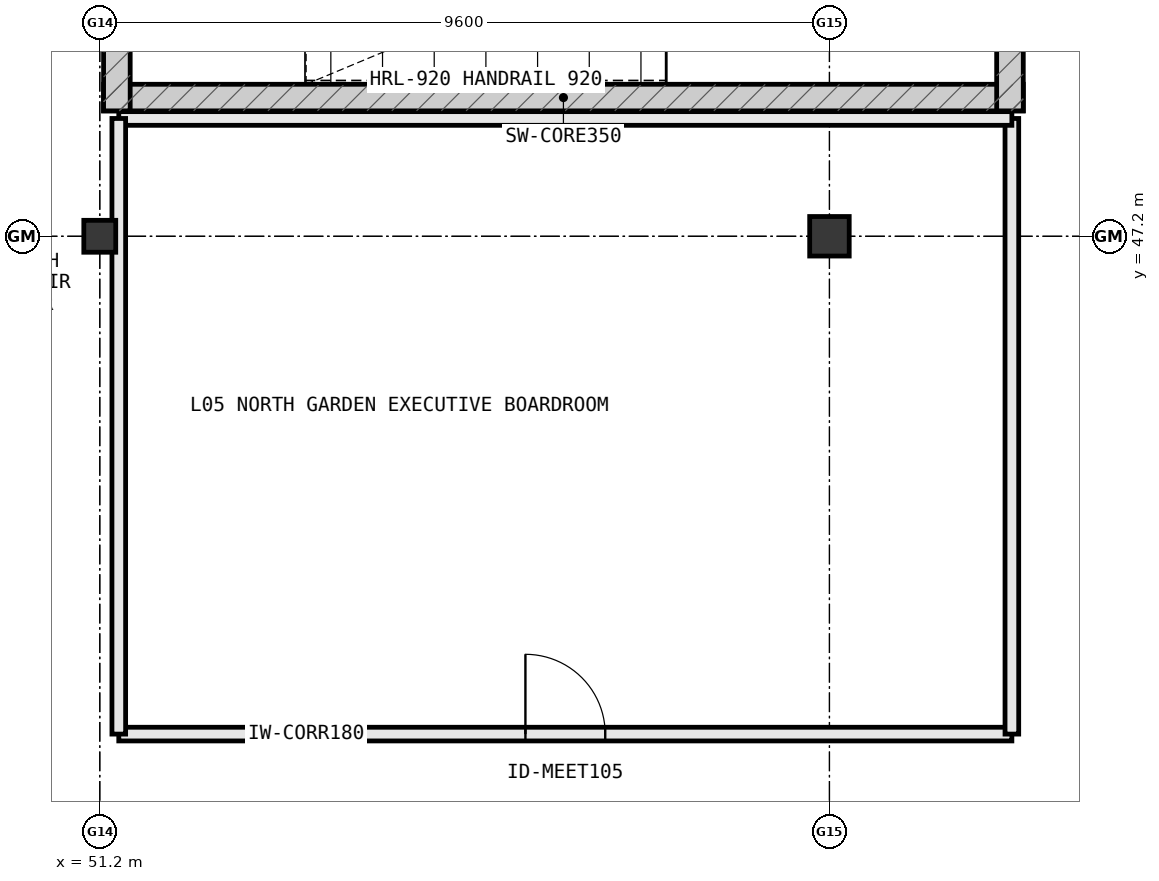
"""IFC4 building model, lengths in metres.
Left out: names, types, materials, properties, quantities, classifications, styles, units other than length and angle.
Written with IfcOpenShell. Run it as: python <this file> out.ifc"""

import sys

from ifc_helpers import new_model, si_unit, direction, frame, frame_2d, origin, origin_2d, place, context, subcontext, project, spatial, rectangle, extrude, element, fill, save


model = new_model("IFC4")
c1 = context("Model", 3, precision=1e-05, world=origin(), true_north=direction((0.0, 1.0)))
c2 = subcontext(c1, "Body", "Model", "MODEL_VIEW")
j1 = project(units=[si_unit("LENGTHUNIT", "METRE"), si_unit("PLANEANGLEUNIT", "RADIAN")], contexts=[c1])
p1 = place(None, origin())
s1 = spatial("IfcSite", under=j1, at=p1, CompositionType="ELEMENT")
p2 = place(p1, origin())
s2 = spatial("IfcBuilding", under=s1, at=p2, CompositionType="ELEMENT")
p3 = place(p2, frame((0.0, 0.0, 23.8)))
s3 = spatial("IfcBuildingStorey", under=s2, at=p3, CompositionType="ELEMENT", Elevation=23.8)
p4 = place(p3, frame((60.8, 47.2, 0.0), z_axis=(0.0, 0.0, 1.0), x_axis=(1.0, 0.0, 0.0)))
e1 = element("IfcColumn", 1, at=p4, inside=s3, PredefinedType="COLUMN", context=c2, shape_type="SweptSolid", body=[
    extrude(rectangle(XDim=0.52, YDim=0.52, at=origin_2d()), origin(), (0.0, 0.0, 1.0), 3.8),
])
p5 = place(p3, frame((51.2, 47.2, 0.0), z_axis=(0.0, 0.0, 1.0), x_axis=(1.0, 0.0, 0.0)))
e2 = element("IfcColumn", 2, at=p5, inside=s3, PredefinedType="COLUMN", context=c2, shape_type="SweptSolid", body=[
    extrude(rectangle(XDim=0.42, YDim=0.42, at=origin_2d()), origin(), (0.0, 0.0, 1.0), 3.8),
])
p6 = place(p3, frame((51.25, 49.025, 0.0), z_axis=(0.0, 0.0, 1.0), x_axis=(1.0, 0.0, 0.0)))
e3 = element("IfcWall", 3, at=p6, inside=s3, PredefinedType="SHEAR", context=c2, shape_type="SweptSolid", body=[
    extrude(rectangle(XDim=12.1, YDim=0.35, at=frame_2d((6.05, 0.0))), origin(), (0.0, 0.0, 1.0), 3.8),
])
p7 = place(p3, frame((63.175, 48.85, 0.0), z_axis=(0.0, 0.0, 1.0), x_axis=(0.0, 1.0, 0.0)))
e4 = element("IfcWall", 4, at=p7, inside=s3, PredefinedType="SHEAR", context=c2, shape_type="SweptSolid", body=[
    extrude(rectangle(XDim=4.5, YDim=0.35, at=frame_2d((2.25, 0.0))), origin(), (0.0, 0.0, 1.0), 3.8),
])
p8 = place(p3, frame((51.425, 53.35, 0.0), z_axis=(0.0, 0.0, 1.0), x_axis=(0.0, -1.0, 0.0)))
e5 = element("IfcWall", 5, at=p8, inside=s3, PredefinedType="SHEAR", context=c2, shape_type="SweptSolid", body=[
    extrude(rectangle(XDim=4.5, YDim=0.35, at=frame_2d((2.25, 0.0))), origin(), (0.0, 0.0, 1.0), 3.8),
])
p9 = place(p8, frame((1.7, 0.0, 0.0)))
e6 = element("IfcOpeningElement", 6, at=p9, cuts=e5, PredefinedType="OPENING", context=c2, shape_type="SweptSolid", body=[
    extrude(rectangle(XDim=1.1, YDim=2.2, at=frame_2d((0.55, 1.1))), frame((0.0, 0.187, 0.0), z_axis=(0.0, -1.0, 0.0), x_axis=(1.0, 0.0, 0.0)), (0.0, 0.0, 1.0), 0.374),
])
p10 = place(p3, frame((51.45, 40.65, 0.0), z_axis=(0.0, 0.0, 1.0), x_axis=(1.0, 0.0, 0.0)))
e7 = element("IfcWall", 7, at=p10, inside=s3, PredefinedType="PARTITIONING", context=c2, shape_type="SweptSolid", body=[
    extrude(rectangle(XDim=11.75, YDim=0.18, at=frame_2d((5.875, 0.0))), origin(), (0.0, 0.0, 1.0), 3.55),
])
p11 = place(p10, frame((5.35, 0.0, 0.0)))
e8 = element("IfcOpeningElement", 8, at=p11, cuts=e7, PredefinedType="OPENING", context=c2, shape_type="SweptSolid", body=[
    extrude(rectangle(XDim=1.05, YDim=2.2, at=frame_2d((0.525, 1.1))), frame((0.0, 0.102, 0.0), z_axis=(0.0, -1.0, 0.0), x_axis=(1.0, 0.0, 0.0)), (0.0, 0.0, 1.0), 0.204),
])
p12 = place(p3, frame((63.2, 40.65, 0.0), z_axis=(0.0, 0.0, 1.0), x_axis=(0.0, 1.0, 0.0)))
e9 = element("IfcWall", 9, at=p12, inside=s3, PredefinedType="PARTITIONING", context=c2, shape_type="SweptSolid", body=[
    extrude(rectangle(XDim=8.1, YDim=0.18, at=frame_2d((4.05, 0.0))), origin(), (0.0, 0.0, 1.0), 3.55),
])
p13 = place(p3, frame((63.2, 48.75, 0.0), z_axis=(0.0, 0.0, 1.0), x_axis=(-1.0, 0.0, 0.0)))
e10 = element("IfcWall", 10, at=p13, inside=s3, PredefinedType="PARTITIONING", context=c2, shape_type="SweptSolid", body=[
    extrude(rectangle(XDim=11.75, YDim=0.18, at=frame_2d((5.875, 0.0))), origin(), (0.0, 0.0, 1.0), 3.55),
])
p14 = place(p3, frame((51.45, 48.75, 0.0), z_axis=(0.0, 0.0, 1.0), x_axis=(0.0, -1.0, 0.0)))
e11 = element("IfcWall", 11, at=p14, inside=s3, PredefinedType="PARTITIONING", context=c2, shape_type="SweptSolid", body=[
    extrude(rectangle(XDim=8.1, YDim=0.18, at=frame_2d((4.05, 0.0))), origin(), (0.0, 0.0, 1.0), 2.905),
])
p15 = place(p11, origin())
e12 = element("IfcDoor", 12, at=p15, inside=s3, OperationType="SINGLE_SWING_LEFT", PredefinedType="DOOR", context=c2, shape_type="SweptSolid", body=[
    extrude(rectangle(XDim=1.05, YDim=2.2, at=frame_2d((0.525, 1.1))), frame((0.0, 0.025, 0.0), z_axis=(0.0, -1.0, 0.0), x_axis=(1.0, 0.0, 0.0)), (0.0, 0.0, 1.0), 0.05),
])
fill(e8, e12)
save(model, sys.argv[1])
